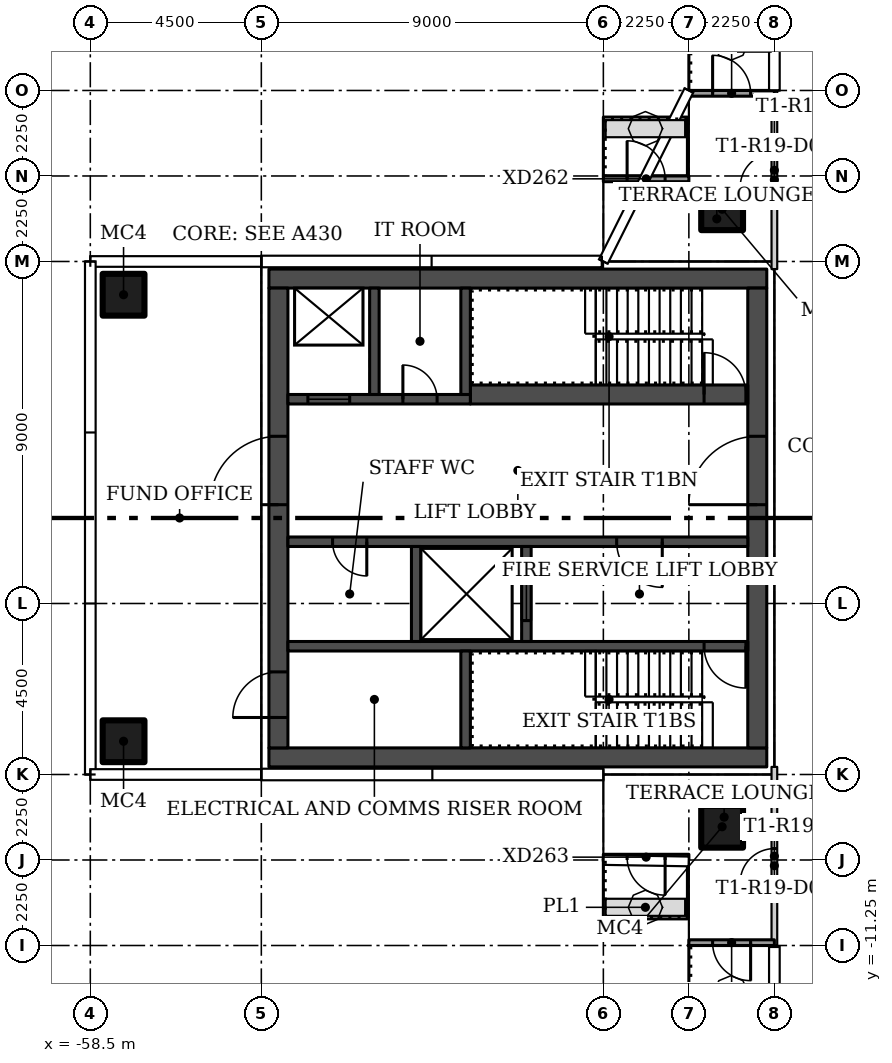
"""IFC4 building model, lengths in metres.
Left out: names, types, materials, properties, quantities, classifications, styles, units other than length and angle.
Written with IfcOpenShell. Run it as: python <this file> out.ifc"""

import sys

from ifc_helpers import new_model, si_unit, direction, frame, frame_2d, origin, origin_2d, place, context, subcontext, project, spatial, rectangle, hollow_rectangle, extrude, element, fill, save


model = new_model("IFC4")
c1 = context("Model", 3, precision=1e-05, world=origin(), true_north=direction((0.0, 1.0)))
c2 = subcontext(c1, "Body", "Model", "MODEL_VIEW")
j1 = project(units=[si_unit("LENGTHUNIT", "METRE"), si_unit("PLANEANGLEUNIT", "RADIAN")], contexts=[c1])
p1 = place(None, origin())
s1 = spatial("IfcSite", under=j1, at=p1, CompositionType="ELEMENT")
p2 = place(p1, origin())
s2 = spatial("IfcBuilding", under=s1, at=p2, CompositionType="ELEMENT")
p3 = place(p2, frame((0.0, 0.0, 174.0)))
s3 = spatial("IfcBuildingStorey", under=s2, at=p3, CompositionType="ELEMENT", Elevation=174.0)
for number, where in (
    (1, (-41.875, 8.125, 0.0)),
    (2, (-41.875, -8.125, 0.0)),
    (3, (-57.625, -5.875, 0.0)),
    (4, (-57.625, 5.875, 0.0)),
):
    element("IfcColumn", number, at=place(p3, frame(where)), inside=s3, PredefinedType="COLUMN", context=c2, shape_type="SweptSolid", body=[
        extrude(hollow_rectangle(XDim=1.1, YDim=1.1, WallThickness=0.04, at=origin_2d()), origin(), (0.0, 0.0, 1.0), 3.45),
    ])
p4 = place(p3, frame((-40.5, -11.25, 0.0), z_axis=(0.0, 0.0, 1.0), x_axis=(0.0, 1.0, 0.0)))
e5 = element("IfcWall", 5, at=p4, inside=s3, PredefinedType="PARTITIONING", context=c2, shape_type="SweptSolid", body=[
    extrude(rectangle(XDim=4.7, YDim=0.15, at=frame_2d((2.35, 0.0))), origin(), (0.0, 0.0, 1.0), 3.45),
])
p5 = place(p4, frame((1.65, 0.0, 0.0)))
e6 = element("IfcOpeningElement", 6, at=p5, cuts=e5, PredefinedType="OPENING", context=c2, shape_type="SweptSolid", body=[
    extrude(rectangle(XDim=0.9, YDim=2.1, at=frame_2d((0.45, 1.05))), frame((0.0, 0.085, 0.0), z_axis=(0.0, -1.0, 0.0), x_axis=(1.0, 0.0, 0.0)), (0.0, 0.0, 1.0), 0.17),
])
p6 = place(p3, frame((-40.5, 6.55, 0.0), z_axis=(0.0, 0.0, 1.0), x_axis=(0.0, 1.0, 0.0)))
e7 = element("IfcWall", 7, at=p6, inside=s3, PredefinedType="PARTITIONING", context=c2, shape_type="SweptSolid", body=[
    extrude(rectangle(XDim=4.7, YDim=0.15, at=frame_2d((2.35, 0.0))), origin(), (0.0, 0.0, 1.0), 3.45),
])
p7 = place(p6, frame((2.15, 0.0, 0.0)))
e8 = element("IfcOpeningElement", 8, at=p7, cuts=e7, PredefinedType="OPENING", context=c2, shape_type="SweptSolid", body=[
    extrude(rectangle(XDim=0.9, YDim=2.1, at=frame_2d((0.45, 1.05))), frame((0.0, 0.085, 0.0), z_axis=(0.0, -1.0, 0.0), x_axis=(1.0, 0.0, 0.0)), (0.0, 0.0, 1.0), 0.17),
])
p8 = place(p3, frame((-42.75, 11.175, 0.0)))
e9 = element("IfcWall", 9, at=p8, inside=s3, PredefinedType="SOLIDWALL", context=c2, shape_type="SweptSolid", body=[
    extrude(rectangle(XDim=2.25, YDim=0.15, at=frame_2d((1.125, 0.0))), origin(), (0.0, 0.0, 1.0), 3.45),
])
p9 = place(p8, frame((0.625, 0.0, 0.0)))
e10 = element("IfcOpeningElement", 10, at=p9, cuts=e9, PredefinedType="OPENING", context=c2, shape_type="SweptSolid", body=[
    extrude(rectangle(XDim=1.0, YDim=2.4, at=frame_2d((0.5, 1.2))), frame((0.0, 0.085, 0.0), z_axis=(0.0, -1.0, 0.0), x_axis=(1.0, 0.0, 0.0)), (0.0, 0.0, 1.0), 0.17),
])
p10 = place(p3, frame((-45.0, 8.925, 0.0)))
e11 = element("IfcWall", 11, at=p10, inside=s3, PredefinedType="SOLIDWALL", context=c2, shape_type="SweptSolid", body=[
    extrude(rectangle(XDim=2.25, YDim=0.15, at=frame_2d((1.125, 0.0))), origin(), (0.0, 0.0, 1.0), 3.45),
])
p11 = place(p10, frame((0.625, 0.0, 0.0)))
e12 = element("IfcOpeningElement", 12, at=p11, cuts=e11, PredefinedType="OPENING", context=c2, shape_type="SweptSolid", body=[
    extrude(rectangle(XDim=1.0, YDim=2.4, at=frame_2d((0.5, 1.2))), frame((0.0, 0.085, 0.0), z_axis=(0.0, -1.0, 0.0), x_axis=(1.0, 0.0, 0.0)), (0.0, 0.0, 1.0), 0.17),
])
p12 = place(p3, frame((-42.75, -8.925, 0.0), z_axis=(0.0, 0.0, 1.0), x_axis=(-1.0, 0.0, 0.0)))
e13 = element("IfcWall", 13, at=p12, inside=s3, PredefinedType="SOLIDWALL", context=c2, shape_type="SweptSolid", body=[
    extrude(rectangle(XDim=2.25, YDim=0.15, at=frame_2d((1.125, 0.0))), origin(), (0.0, 0.0, 1.0), 3.45),
])
p13 = place(p12, frame((0.625, 0.0, 0.0)))
e14 = element("IfcOpeningElement", 14, at=p13, cuts=e13, PredefinedType="OPENING", context=c2, shape_type="SweptSolid", body=[
    extrude(rectangle(XDim=1.0, YDim=2.4, at=frame_2d((0.5, 1.2))), frame((0.0, 0.085, 0.0), z_axis=(0.0, -1.0, 0.0), x_axis=(1.0, 0.0, 0.0)), (0.0, 0.0, 1.0), 0.17),
])
p14 = place(p3, frame((-40.5, -11.175, 0.0), z_axis=(0.0, 0.0, 1.0), x_axis=(-1.0, 0.0, 0.0)))
e15 = element("IfcWall", 15, at=p14, inside=s3, PredefinedType="SOLIDWALL", context=c2, shape_type="SweptSolid", body=[
    extrude(rectangle(XDim=2.25, YDim=0.15, at=frame_2d((1.125, 0.0))), origin(), (0.0, 0.0, 1.0), 3.45),
])
p15 = place(p14, frame((0.625, 0.0, 0.0)))
e16 = element("IfcOpeningElement", 16, at=p15, cuts=e15, PredefinedType="OPENING", context=c2, shape_type="SweptSolid", body=[
    extrude(rectangle(XDim=1.0, YDim=2.4, at=frame_2d((0.5, 1.2))), frame((0.0, 0.085, 0.0), z_axis=(0.0, -1.0, 0.0), x_axis=(1.0, 0.0, 0.0)), (0.0, 0.0, 1.0), 0.17),
])
for number, where, z_axis, x_axis in (
    (17, (-40.7, -6.3, 0.0), (0.0, 0.0, 1.0), (-1.0, 0.0, 0.0)),
    (18, (-40.7, 6.3, 0.0), (0.0, 0.0, 1.0), (-1.0, 0.0, 0.0)),
):
    element("IfcWall", number, at=place(p3, frame(where, z_axis=z_axis, x_axis=x_axis)), inside=s3, PredefinedType="SHEAR", context=c2, shape_type="SweptSolid", body=[
        extrude(rectangle(XDim=13.1, YDim=0.5, at=frame_2d((6.55, 0.0))), origin(), (0.0, 0.0, 1.0), 3.45),
    ])
p16 = place(p3, frame((-40.95, -6.05, 0.0), z_axis=(0.0, 0.0, 1.0), x_axis=(0.0, 1.0, 0.0)))
e19 = element("IfcWall", 19, at=p16, inside=s3, PredefinedType="SHEAR", context=c2, shape_type="SweptSolid", body=[
    extrude(rectangle(XDim=12.1, YDim=0.5, at=frame_2d((6.05, 0.0))), origin(), (0.0, 0.0, 1.0), 3.45),
])
p17 = place(p16, frame((6.4, 0.0, 0.0)))
e20 = element("IfcOpeningElement", 20, at=p17, cuts=e19, PredefinedType="OPENING", context=c2, shape_type="SweptSolid", body=[
    extrude(rectangle(XDim=1.8, YDim=2.4, at=frame_2d((0.9, 1.2))), frame((0.0, 0.26, 0.0), z_axis=(0.0, -1.0, 0.0), x_axis=(1.0, 0.0, 0.0)), (0.0, 0.0, 1.0), 0.52),
])
p18 = place(p3, frame((-53.55, -6.05, 0.0), z_axis=(0.0, 0.0, 1.0), x_axis=(0.0, 1.0, 0.0)))
e21 = element("IfcWall", 21, at=p18, inside=s3, PredefinedType="SHEAR", context=c2, shape_type="SweptSolid", body=[
    extrude(rectangle(XDim=12.1, YDim=0.5, at=frame_2d((6.05, 0.0))), origin(), (0.0, 0.0, 1.0), 3.45),
])
p19 = place(p18, frame((0.8, 0.0, 0.0)))
e22 = element("IfcOpeningElement", 22, at=p19, cuts=e21, PredefinedType="OPENING", context=c2, shape_type="SweptSolid", body=[
    extrude(rectangle(XDim=1.2, YDim=2.1, at=frame_2d((0.6, 1.05))), frame((0.0, 0.26, 0.0), z_axis=(0.0, -1.0, 0.0), x_axis=(1.0, 0.0, 0.0)), (0.0, 0.0, 1.0), 0.52),
])
p20 = place(p18, frame((6.4, 0.0, 0.0)))
e23 = element("IfcOpeningElement", 23, at=p20, cuts=e21, PredefinedType="OPENING", context=c2, shape_type="SweptSolid", body=[
    extrude(rectangle(XDim=1.8, YDim=2.4, at=frame_2d((0.9, 1.2))), frame((0.0, 0.26, 0.0), z_axis=(0.0, -1.0, 0.0), x_axis=(1.0, 0.0, 0.0)), (0.0, 0.0, 1.0), 0.52),
])
p21 = place(p3, frame((-41.2, -3.375, 0.0), z_axis=(0.0, 0.0, 1.0), x_axis=(-1.0, 0.0, 0.0)))
e24 = element("IfcWall", 24, at=p21, inside=s3, PredefinedType="SHEAR", context=c2, shape_type="SweptSolid", body=[
    extrude(rectangle(XDim=12.1, YDim=0.25, at=frame_2d((6.05, 0.0))), origin(), (0.0, 0.0, 1.0), 3.45),
])
p22 = place(p21, frame((0.05, 0.0, 0.0)))
e25 = element("IfcOpeningElement", 25, at=p22, cuts=e24, PredefinedType="OPENING", context=c2, shape_type="SweptSolid", body=[
    extrude(rectangle(XDim=1.1, YDim=2.1, at=frame_2d((0.55, 1.05))), frame((0.0, 0.135, 0.0), z_axis=(0.0, -1.0, 0.0), x_axis=(1.0, 0.0, 0.0)), (0.0, 0.0, 1.0), 0.27),
])
p23 = place(p3, frame((-48.625, -6.05, 0.0), z_axis=(0.0, 0.0, 1.0), x_axis=(0.0, 1.0, 0.0)))
e26 = element("IfcWall", 26, at=p23, inside=s3, PredefinedType="SHEAR", context=c2, shape_type="SweptSolid", body=[
    extrude(rectangle(XDim=2.55, YDim=0.25, at=frame_2d((1.275, 0.0))), origin(), (0.0, 0.0, 1.0), 3.45),
])
p24 = place(p3, frame((-41.2, -0.625, 0.0), z_axis=(0.0, 0.0, 1.0), x_axis=(-1.0, 0.0, 0.0)))
e27 = element("IfcWall", 27, at=p24, inside=s3, PredefinedType="SHEAR", context=c2, shape_type="SweptSolid", body=[
    extrude(rectangle(XDim=12.1, YDim=0.25, at=frame_2d((6.05, 0.0))), origin(), (0.0, 0.0, 1.0), 3.45),
])
p25 = place(p24, frame((2.25, 0.0, 0.0)))
e28 = element("IfcOpeningElement", 28, at=p25, cuts=e27, PredefinedType="OPENING", context=c2, shape_type="SweptSolid", body=[
    extrude(rectangle(XDim=1.2, YDim=2.1, at=frame_2d((0.6, 1.05))), frame((0.0, 0.135, 0.0), z_axis=(0.0, -1.0, 0.0), x_axis=(1.0, 0.0, 0.0)), (0.0, 0.0, 1.0), 0.27),
])
p26 = place(p24, frame((10.025, 0.0, 0.0)))
e29 = element("IfcOpeningElement", 29, at=p26, cuts=e27, PredefinedType="OPENING", context=c2, shape_type="SweptSolid", body=[
    extrude(rectangle(XDim=0.9, YDim=2.1, at=frame_2d((0.45, 1.05))), frame((0.0, 0.135, 0.0), z_axis=(0.0, -1.0, 0.0), x_axis=(1.0, 0.0, 0.0)), (0.0, 0.0, 1.0), 0.27),
])
p27 = place(p3, frame((-47.025, -3.25, 0.0), z_axis=(0.0, 0.0, 1.0), x_axis=(0.0, 1.0, 0.0)))
e30 = element("IfcWall", 30, at=p27, inside=s3, PredefinedType="SHEAR", context=c2, shape_type="SweptSolid", body=[
    extrude(rectangle(XDim=2.5, YDim=0.25, at=frame_2d((1.25, 0.0))), origin(), (0.0, 0.0, 1.0), 3.45),
])
p28 = place(p27, frame((0.55, 0.0, 0.0)))
e31 = element("IfcOpeningElement", 31, at=p28, cuts=e30, PredefinedType="OPENING", context=c2, shape_type="SweptSolid", body=[
    extrude(rectangle(XDim=1.4, YDim=2.4, at=frame_2d((0.7, 1.2))), frame((0.0, 0.135, 0.0), z_axis=(0.0, -1.0, 0.0), x_axis=(1.0, 0.0, 0.0)), (0.0, 0.0, 1.0), 0.27),
])
p29 = place(p3, frame((-49.925, -3.25, 0.0), z_axis=(0.0, 0.0, 1.0), x_axis=(0.0, 1.0, 0.0)))
e32 = element("IfcWall", 32, at=p29, inside=s3, PredefinedType="SHEAR", context=c2, shape_type="SweptSolid", body=[
    extrude(rectangle(XDim=2.5, YDim=0.25, at=frame_2d((1.25, 0.0))), origin(), (0.0, 0.0, 1.0), 3.45),
])
p30 = place(p3, frame((-48.5, 3.25, 0.0)))
e33 = element("IfcWall", 33, at=p30, inside=s3, PredefinedType="SHEAR", context=c2, shape_type="SweptSolid", body=[
    extrude(rectangle(XDim=7.3, YDim=0.5, at=frame_2d((3.65, 0.0))), origin(), (0.0, 0.0, 1.0), 3.45),
])
p31 = place(p30, frame((6.15, 0.0, 0.0)))
e34 = element("IfcOpeningElement", 34, at=p31, cuts=e33, PredefinedType="OPENING", context=c2, shape_type="SweptSolid", body=[
    extrude(rectangle(XDim=1.1, YDim=2.1, at=frame_2d((0.55, 1.05))), frame((0.0, 0.26, 0.0), z_axis=(0.0, -1.0, 0.0), x_axis=(1.0, 0.0, 0.0)), (0.0, 0.0, 1.0), 0.52),
])
p32 = place(p3, frame((-53.3, 3.125, 0.0)))
e35 = element("IfcWall", 35, at=p32, inside=s3, PredefinedType="SHEAR", context=c2, shape_type="SweptSolid", body=[
    extrude(rectangle(XDim=4.8, YDim=0.25, at=frame_2d((2.4, 0.0))), origin(), (0.0, 0.0, 1.0), 3.45),
])
p33 = place(p32, frame((0.525, 0.0, 0.0)))
e36 = element("IfcOpeningElement", 36, at=p33, cuts=e35, PredefinedType="OPENING", context=c2, shape_type="SweptSolid", body=[
    extrude(rectangle(XDim=1.1, YDim=2.1, at=frame_2d((0.55, 1.05))), frame((0.0, 0.135, 0.0), z_axis=(0.0, -1.0, 0.0), x_axis=(1.0, 0.0, 0.0)), (0.0, 0.0, 1.0), 0.27),
])
p34 = place(p32, frame((3.025, 0.0, 0.0)))
e37 = element("IfcOpeningElement", 37, at=p34, cuts=e35, PredefinedType="OPENING", context=c2, shape_type="SweptSolid", body=[
    extrude(rectangle(XDim=0.9, YDim=2.1, at=frame_2d((0.45, 1.05))), frame((0.0, 0.135, 0.0), z_axis=(0.0, -1.0, 0.0), x_axis=(1.0, 0.0, 0.0)), (0.0, 0.0, 1.0), 0.27),
])
for number, where, z_axis, x_axis in (
    (38, (-48.625, 3.25, 0.0), (0.0, 0.0, 1.0), (0.0, 1.0, 0.0)),
    (39, (-51.025, 3.25, 0.0), (0.0, 0.0, 1.0), (0.0, 1.0, 0.0)),
):
    element("IfcWall", number, at=place(p3, frame(where, z_axis=z_axis, x_axis=x_axis)), inside=s3, PredefinedType="SHEAR", context=c2, shape_type="SweptSolid", body=[
        extrude(rectangle(XDim=2.8, YDim=0.25, at=frame_2d((1.4, 0.0))), origin(), (0.0, 0.0, 1.0), 3.45),
    ])
p35 = place(p5, origin())
e40 = element("IfcDoor", 40, at=p35, inside=s3, OperationType="SINGLE_SWING_LEFT", PredefinedType="DOOR", context=c2, shape_type="SweptSolid", body=[
    extrude(rectangle(XDim=0.9, YDim=2.1, at=frame_2d((0.45, 1.05))), frame((0.0, 0.025, 0.0), z_axis=(0.0, -1.0, 0.0), x_axis=(1.0, 0.0, 0.0)), (0.0, 0.0, 1.0), 0.05),
])
fill(e6, e40)
p36 = place(p7, origin())
e41 = element("IfcDoor", 41, at=p36, inside=s3, OperationType="SINGLE_SWING_RIGHT", PredefinedType="DOOR", context=c2, shape_type="SweptSolid", body=[
    extrude(rectangle(XDim=0.9, YDim=2.1, at=frame_2d((0.45, 1.05))), frame((0.0, 0.025, 0.0), z_axis=(0.0, -1.0, 0.0), x_axis=(1.0, 0.0, 0.0)), (0.0, 0.0, 1.0), 0.05),
])
fill(e8, e41)
p37 = place(p9, origin())
e42 = element("IfcDoor", 42, at=p37, inside=s3, OperationType="SINGLE_SWING_LEFT", PredefinedType="DOOR", context=c2, shape_type="SweptSolid", body=[
    extrude(rectangle(XDim=1.0, YDim=2.4, at=frame_2d((0.5, 1.2))), frame((0.0, 0.025, 0.0), z_axis=(0.0, -1.0, 0.0), x_axis=(1.0, 0.0, 0.0)), (0.0, 0.0, 1.0), 0.05),
])
fill(e10, e42)
p38 = place(p11, origin())
e43 = element("IfcDoor", 43, at=p38, inside=s3, OperationType="SINGLE_SWING_RIGHT", PredefinedType="DOOR", context=c2, shape_type="SweptSolid", body=[
    extrude(rectangle(XDim=1.0, YDim=2.4, at=frame_2d((0.5, 1.2))), frame((0.0, 0.025, 0.0), z_axis=(0.0, -1.0, 0.0), x_axis=(1.0, 0.0, 0.0)), (0.0, 0.0, 1.0), 0.05),
])
fill(e12, e43)
p39 = place(p13, origin())
e44 = element("IfcDoor", 44, at=p39, inside=s3, OperationType="SINGLE_SWING_LEFT", PredefinedType="DOOR", context=c2, shape_type="SweptSolid", body=[
    extrude(rectangle(XDim=1.0, YDim=2.4, at=frame_2d((0.5, 1.2))), frame((0.0, 0.025, 0.0), z_axis=(0.0, -1.0, 0.0), x_axis=(1.0, 0.0, 0.0)), (0.0, 0.0, 1.0), 0.05),
])
fill(e14, e44)
p40 = place(p15, origin())
e45 = element("IfcDoor", 45, at=p40, inside=s3, OperationType="SINGLE_SWING_RIGHT", PredefinedType="DOOR", context=c2, shape_type="SweptSolid", body=[
    extrude(rectangle(XDim=1.0, YDim=2.4, at=frame_2d((0.5, 1.2))), frame((0.0, 0.025, 0.0), z_axis=(0.0, -1.0, 0.0), x_axis=(1.0, 0.0, 0.0)), (0.0, 0.0, 1.0), 0.05),
])
fill(e16, e45)
p41 = place(p17, origin())
e46 = element("IfcDoor", 46, at=p41, inside=s3, OperationType="DOUBLE_DOOR_SINGLE_SWING", PredefinedType="DOOR", context=c2, shape_type="SweptSolid", body=[
    extrude(rectangle(XDim=1.8, YDim=2.4, at=frame_2d((0.9, 1.2))), frame((0.0, 0.025, 0.0), z_axis=(0.0, -1.0, 0.0), x_axis=(1.0, 0.0, 0.0)), (0.0, 0.0, 1.0), 0.05),
])
fill(e20, e46)
p42 = place(p19, origin())
e47 = element("IfcDoor", 47, at=p42, inside=s3, OperationType="SINGLE_SWING_LEFT", PredefinedType="DOOR", context=c2, shape_type="SweptSolid", body=[
    extrude(rectangle(XDim=1.2, YDim=2.1, at=frame_2d((0.6, 1.05))), frame((0.0, 0.025, 0.0), z_axis=(0.0, -1.0, 0.0), x_axis=(1.0, 0.0, 0.0)), (0.0, 0.0, 1.0), 0.05),
])
fill(e22, e47)
p43 = place(p20, origin())
e48 = element("IfcDoor", 48, at=p43, inside=s3, OperationType="DOUBLE_DOOR_SINGLE_SWING", PredefinedType="DOOR", context=c2, shape_type="SweptSolid", body=[
    extrude(rectangle(XDim=1.8, YDim=2.4, at=frame_2d((0.9, 1.2))), frame((0.0, 0.025, 0.0), z_axis=(0.0, -1.0, 0.0), x_axis=(1.0, 0.0, 0.0)), (0.0, 0.0, 1.0), 0.05),
])
fill(e23, e48)
p44 = place(p22, origin())
e49 = element("IfcDoor", 49, at=p44, inside=s3, OperationType="SINGLE_SWING_LEFT", PredefinedType="DOOR", context=c2, shape_type="SweptSolid", body=[
    extrude(rectangle(XDim=1.1, YDim=2.1, at=frame_2d((0.55, 1.05))), frame((0.0, 0.025, 0.0), z_axis=(0.0, -1.0, 0.0), x_axis=(1.0, 0.0, 0.0)), (0.0, 0.0, 1.0), 0.05),
])
fill(e25, e49)
p45 = place(p25, origin())
e50 = element("IfcDoor", 50, at=p45, inside=s3, OperationType="SINGLE_SWING_LEFT", PredefinedType="DOOR", context=c2, shape_type="SweptSolid", body=[
    extrude(rectangle(XDim=1.2, YDim=2.1, at=frame_2d((0.6, 1.05))), frame((0.0, 0.025, 0.0), z_axis=(0.0, -1.0, 0.0), x_axis=(1.0, 0.0, 0.0)), (0.0, 0.0, 1.0), 0.05),
])
fill(e28, e50)
p46 = place(p26, origin())
e51 = element("IfcDoor", 51, at=p46, inside=s3, OperationType="SINGLE_SWING_RIGHT", PredefinedType="DOOR", context=c2, shape_type="SweptSolid", body=[
    extrude(rectangle(XDim=0.9, YDim=2.1, at=frame_2d((0.45, 1.05))), frame((0.0, 0.025, 0.0), z_axis=(0.0, -1.0, 0.0), x_axis=(1.0, 0.0, 0.0)), (0.0, 0.0, 1.0), 0.05),
])
fill(e29, e51)
p47 = place(p28, origin())
e52 = element("IfcDoor", 52, at=p47, inside=s3, OperationType="SLIDING_TO_LEFT", PredefinedType="DOOR", context=c2, shape_type="SweptSolid", body=[
    extrude(rectangle(XDim=1.4, YDim=2.4, at=frame_2d((0.7, 1.2))), frame((0.0, 0.025, 0.0), z_axis=(0.0, -1.0, 0.0), x_axis=(1.0, 0.0, 0.0)), (0.0, 0.0, 1.0), 0.05),
])
fill(e31, e52)
p48 = place(p31, origin())
e53 = element("IfcDoor", 53, at=p48, inside=s3, OperationType="SINGLE_SWING_RIGHT", PredefinedType="DOOR", context=c2, shape_type="SweptSolid", body=[
    extrude(rectangle(XDim=1.1, YDim=2.1, at=frame_2d((0.55, 1.05))), frame((0.0, 0.025, 0.0), z_axis=(0.0, -1.0, 0.0), x_axis=(1.0, 0.0, 0.0)), (0.0, 0.0, 1.0), 0.05),
])
fill(e34, e53)
p49 = place(p33, origin())
e54 = element("IfcDoor", 54, at=p49, inside=s3, OperationType="SLIDING_TO_LEFT", PredefinedType="DOOR", context=c2, shape_type="SweptSolid", body=[
    extrude(rectangle(XDim=1.1, YDim=2.1, at=frame_2d((0.55, 1.05))), frame((0.0, 0.025, 0.0), z_axis=(0.0, -1.0, 0.0), x_axis=(1.0, 0.0, 0.0)), (0.0, 0.0, 1.0), 0.05),
])
fill(e36, e54)
p50 = place(p34, origin())
e55 = element("IfcDoor", 55, at=p50, inside=s3, OperationType="SINGLE_SWING_RIGHT", PredefinedType="DOOR", context=c2, shape_type="SweptSolid", body=[
    extrude(rectangle(XDim=0.9, YDim=2.1, at=frame_2d((0.45, 1.05))), frame((0.0, 0.025, 0.0), z_axis=(0.0, -1.0, 0.0), x_axis=(1.0, 0.0, 0.0)), (0.0, 0.0, 1.0), 0.05),
])
fill(e37, e55)
save(model, sys.argv[1])
